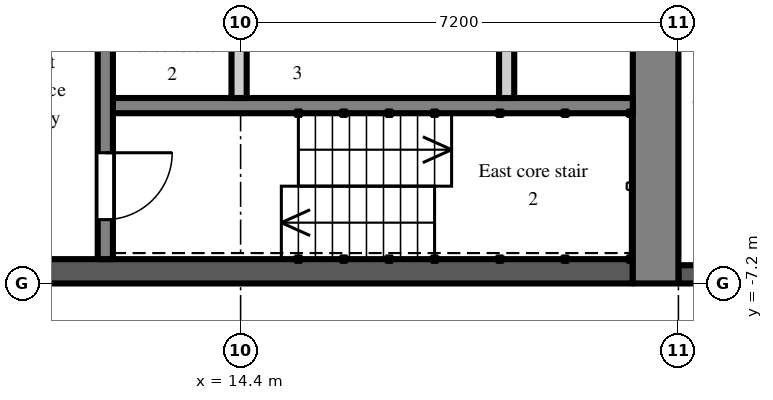
"""IFC4 building model, lengths in metres.
Left out: names, types, materials, properties, quantities, classifications, styles, units other than length and angle.
Written with IfcOpenShell. Run it as: python <this file> out.ifc"""

import sys

from ifc_helpers import new_model, si_unit, direction, frame, frame_2d, origin, place, context, subcontext, project, spatial, rectangle, extrude, element, fill, save


model = new_model("IFC4")
c1 = context("Model", 3, precision=1e-05, world=origin(), true_north=direction((0.0, 1.0)))
c2 = subcontext(c1, "Body", "Model", "MODEL_VIEW")
j1 = project(units=[si_unit("LENGTHUNIT", "METRE"), si_unit("PLANEANGLEUNIT", "RADIAN")], contexts=[c1])
p1 = place(None, origin())
s1 = spatial("IfcSite", under=j1, at=p1, CompositionType="ELEMENT")
p2 = place(p1, origin())
s2 = spatial("IfcBuilding", under=s1, at=p2, CompositionType="ELEMENT")
p3 = place(p2, frame((0.0, 0.0, 231.9)))
s3 = spatial("IfcBuildingStorey", under=s2, at=p3, CompositionType="ELEMENT", Elevation=231.9)
p4 = place(p3, frame((21.6, -7.05, 0.0), z_axis=(0.0, 0.0, 1.0), x_axis=(1.0, 0.0, 0.0)))
e1 = element("IfcWall", 1, at=p4, inside=s3, PredefinedType="SOLIDWALL", context=c2, shape_type="SweptSolid", body=[
    extrude(rectangle(XDim=2.7, YDim=0.3, at=frame_2d((1.35, 0.0))), origin(), (0.0, 0.0, 1.0), 2.3),
])
p5 = place(p4, frame((0.75, 0.0, 0.2)))
e2 = element("IfcOpeningElement", 2, at=p5, cuts=e1, PredefinedType="OPENING", context=c2, shape_type="SweptSolid", body=[
    extrude(rectangle(XDim=1.2, YDim=1.85, at=frame_2d((0.6, 0.925))), frame((0.0, 0.16, 0.0), z_axis=(0.0, -1.0, 0.0), x_axis=(1.0, 0.0, 0.0)), (0.0, 0.0, 1.0), 0.32),
])
p6 = place(p3, frame((21.225, -7.2, 0.0), z_axis=(0.0, 0.0, 1.0), x_axis=(0.0, 1.0, 0.0)))
e3 = element("IfcWall", 3, at=p6, inside=s3, PredefinedType="SHEAR", context=c2, shape_type="SweptSolid", body=[
    extrude(rectangle(XDim=14.4, YDim=0.75, at=frame_2d((7.2, 0.0))), origin(), (0.0, 0.0, 1.0), 2.6),
])
p7 = place(p6, frame((6.0, 0.0, 0.0)))
e4 = element("IfcOpeningElement", 4, at=p7, cuts=e3, PredefinedType="OPENING", context=c2, shape_type="SweptSolid", body=[
    extrude(rectangle(XDim=2.4, YDim=2.2, at=frame_2d((1.2, 1.1))), frame((0.0, 0.385, 0.0), z_axis=(0.0, -1.0, 0.0), x_axis=(1.0, 0.0, 0.0)), (0.0, 0.0, 1.0), 0.77),
])
p8 = place(p3, frame((7.9, -7.0, 0.0), z_axis=(0.0, 0.0, 1.0), x_axis=(1.0, 0.0, 0.0)))
e5 = element("IfcWall", 5, at=p8, inside=s3, PredefinedType="SHEAR", context=c2, shape_type="SweptSolid", body=[
    extrude(rectangle(XDim=12.95, YDim=0.4, at=frame_2d((6.475, 0.0))), origin(), (0.0, 0.0, 1.0), 2.6),
])
p9 = place(p3, frame((12.3, -4.275, 0.0), z_axis=(0.0, 0.0, 1.0), x_axis=(1.0, 0.0, 0.0)))
e6 = element("IfcWall", 6, at=p9, inside=s3, PredefinedType="SHEAR", context=c2, shape_type="SweptSolid", body=[
    extrude(rectangle(XDim=8.55, YDim=0.25, at=frame_2d((4.275, 0.0))), origin(), (0.0, 0.0, 1.0), 2.6),
])
p10 = place(p3, frame((12.175, -2.05, 0.0), z_axis=(0.0, 0.0, 1.0), x_axis=(0.0, -1.0, 0.0)))
e7 = element("IfcWall", 7, at=p10, inside=s3, PredefinedType="SHEAR", context=c2, shape_type="SweptSolid", body=[
    extrude(rectangle(XDim=4.75, YDim=0.25, at=frame_2d((2.375, 0.0))), origin(), (0.0, 0.0, 1.0), 2.6),
])
p11 = place(p10, frame((3.0, 0.0, 0.0)))
e8 = element("IfcOpeningElement", 8, at=p11, cuts=e7, PredefinedType="OPENING", context=c2, shape_type="SweptSolid", body=[
    extrude(rectangle(XDim=1.1, YDim=2.1, at=frame_2d((0.55, 1.05))), frame((0.0, 0.135, 0.0), z_axis=(0.0, -1.0, 0.0), x_axis=(1.0, 0.0, 0.0)), (0.0, 0.0, 1.0), 0.27),
])
for number, where, z_axis, x_axis in (
    (9, (14.375, -2.05, 0.0), (0.0, 0.0, 1.0), (0.0, -1.0, 0.0)),
    (10, (18.775, -2.05, 0.0), (0.0, 0.0, 1.0), (0.0, -1.0, 0.0)),
):
    element("IfcWall", number, at=place(p3, frame(where, z_axis=z_axis, x_axis=x_axis)), inside=s3, PredefinedType="PARTITIONING", context=c2, shape_type="SweptSolid", body=[
        extrude(rectangle(XDim=2.1, YDim=0.25, at=frame_2d((1.05, 0.0))), origin(), (0.0, 0.0, 1.0), 2.6),
    ])
p12 = place(p11, origin())
e11 = element("IfcDoor", 11, at=p12, inside=s3, OperationType="SINGLE_SWING_LEFT", PredefinedType="DOOR", context=c2, shape_type="SweptSolid", body=[
    extrude(rectangle(XDim=1.1, YDim=2.1, at=frame_2d((0.55, 1.05))), frame((0.0, 0.025, 0.0), z_axis=(0.0, -1.0, 0.0), x_axis=(1.0, 0.0, 0.0)), (0.0, 0.0, 1.0), 0.05),
])
fill(e8, e11)
save(model, sys.argv[1])
